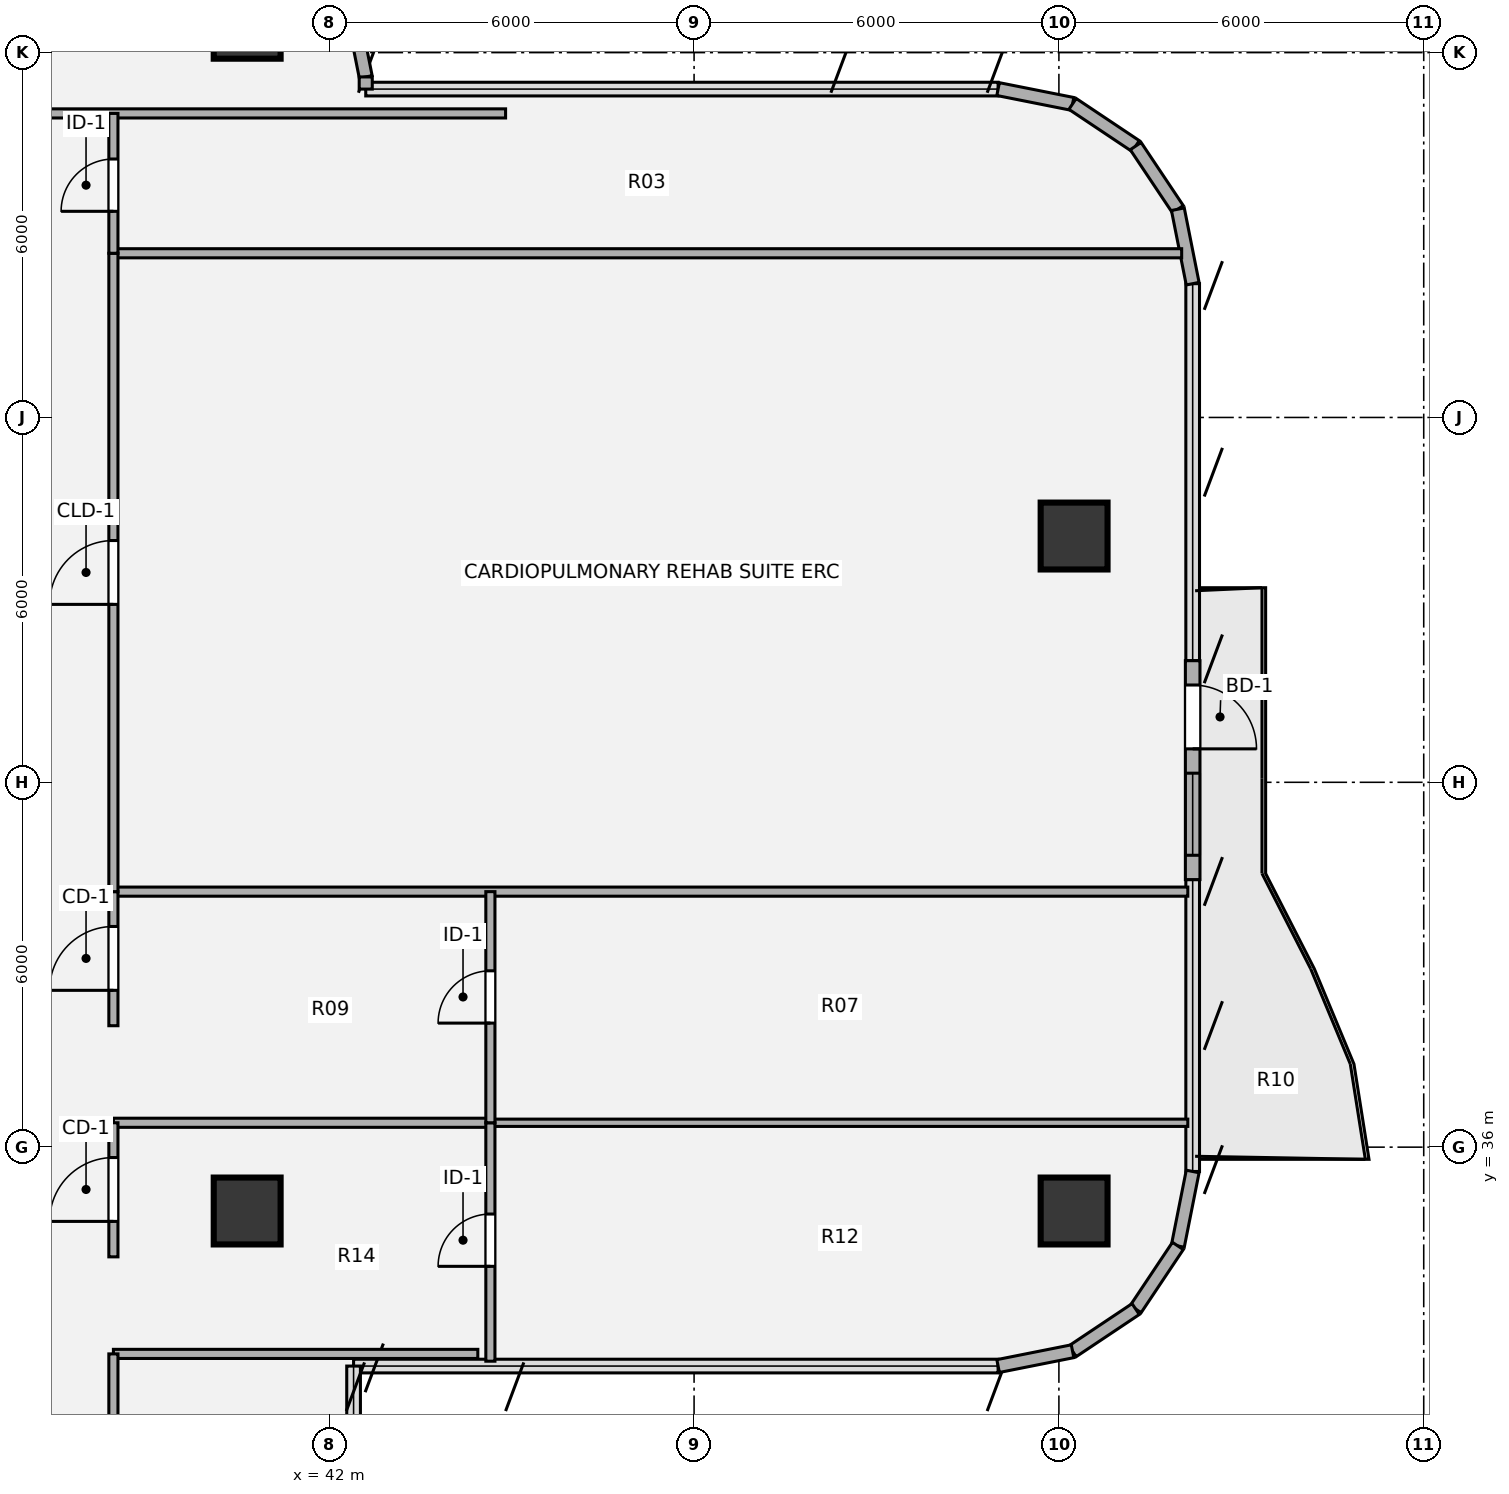
"""IFC4 building model, lengths in metres.
Left out: names, types, materials, properties, quantities, classifications, styles, units other than length and angle.
Written with IfcOpenShell. Run it as: python <this file> out.ifc"""

import sys

from ifc_helpers import new_model, si_unit, direction, frame, frame_2d, origin, origin_2d, place, context, subcontext, project, spatial, rectangle, hollow_circle, extrude, source, transform, mapped, element, fill, save


model = new_model("IFC4")
c1 = context("Model", 3, precision=1e-05, world=origin(), true_north=direction((0.0, 1.0)))
c2 = subcontext(c1, "Body", "Model", "MODEL_VIEW")
j1 = project(units=[si_unit("LENGTHUNIT", "METRE"), si_unit("PLANEANGLEUNIT", "RADIAN")], contexts=[c1])
p1 = place(None, origin())
s1 = spatial("IfcSite", under=j1, at=p1, CompositionType="ELEMENT")
p2 = place(p1, origin())
s2 = spatial("IfcBuilding", under=s1, at=p2, CompositionType="ELEMENT")
p3 = place(p2, frame((0.0, 0.0, 175.32)))
s3 = spatial("IfcBuildingStorey", under=s2, at=p3, CompositionType="ELEMENT", Elevation=175.32)
m1 = source(origin(), c2, "Body", "SweptSolid", [
    extrude(hollow_circle(Radius=0.55, WallThickness=0.04, at=origin_2d()), origin(), (0.0, 0.0, 1.0), 3.78),
])
for number, where, z_axis, x_axis in (
    (1, (54.25, 34.95, 0.0), (0.0, 0.0, 1.0), (1.0, 0.0, 0.0)),
    (2, (54.25, 46.05, 0.0), (0.0, 0.0, 1.0), (1.0, 0.0, 0.0)),
    (3, (40.65, 34.95, 0.0), (0.0, 0.0, 1.0), (1.0, 0.0, 0.0)),
    (4, (40.65, 54.45, 0.0), (0.0, 0.0, 1.0), (1.0, 0.0, 0.0)),
):
    element("IfcColumn", number, at=place(p3, frame(where, z_axis=z_axis, x_axis=x_axis)), inside=s3, PredefinedType="COLUMN", context=c2, shape_type="MappedRepresentation", body=[
        mapped(m1, transform((0.0, 0.0, 0.0), x_axis=(1.0, 0.0, 0.0), y_axis=(0.0, 1.0, 0.0), z_axis=(0.0, 0.0, 1.0), scale=1.0)),
    ])
p4 = place(p3, frame((42.387, 54.671, 0.0), z_axis=(0.0, 0.0, 1.0), x_axis=(0.195127417394, -0.980777900945, 0.0)))
e5 = element("IfcWall", 5, at=p4, inside=s3, PredefinedType="SOLIDWALL", context=c2, shape_type="SweptSolid", body=[
    extrude(rectangle(XDim=1.092, YDim=0.215, at=frame_2d((0.546, 0.0))), origin(), (0.0, 0.0, 1.0), 3.53),
])
p5 = place(p3, frame((42.6, 53.6, 0.0), z_axis=(0.0, 0.0, 1.0), x_axis=(0.0, -1.0, 0.0)))
e6 = element("IfcWall", 6, at=p5, inside=s3, PredefinedType="SOLIDWALL", context=c2, shape_type="SweptSolid", body=[
    extrude(rectangle(XDim=0.2, YDim=0.215, at=frame_2d((0.1, 0.0))), origin(), (0.0, 0.0, 1.0), 3.53),
])
for number, where, z_axis, x_axis in (
    (7, (53.0, 53.4, 0.0), (0.0, 0.0, 1.0), (0.981, -0.195, 0.0)),
    (8, (54.225, 53.156, 0.0), (0.0, 0.0, 1.0), (0.831, -0.556, 0.0)),
    (9, (55.263, 52.463, 0.0), (0.0, 0.0, 1.0), (0.556, -0.831, 0.0)),
    (10, (55.956, 51.425, 0.0), (0.0, 0.0, 1.0), (0.195, -0.981, 0.0)),
):
    element("IfcWall", number, at=place(p3, frame(where, z_axis=z_axis, x_axis=x_axis)), inside=s3, PredefinedType="SOLIDWALL", context=c2, shape_type="SweptSolid", body=[
        extrude(rectangle(XDim=1.249, YDim=0.215, at=frame_2d((0.624, 0.0))), origin(), (0.0, 0.0, 1.0), 3.53),
    ])
p6 = place(p3, frame((56.2, 44.0, 0.0), z_axis=(0.0, 0.0, 1.0), x_axis=(0.0, -1.0, 0.0)))
e11 = element("IfcWall", 11, at=p6, inside=s3, PredefinedType="SOLIDWALL", context=c2, shape_type="SweptSolid", body=[
    extrude(rectangle(XDim=3.6, YDim=0.24, at=frame_2d((1.8, 0.0))), origin(), (0.0, 0.0, 1.0), 3.53),
])
p7 = place(p6, frame((0.4, 0.0, 0.0)))
e12 = element("IfcOpeningElement", 12, at=p7, cuts=e11, PredefinedType="OPENING", context=c2, shape_type="SweptSolid", body=[
    extrude(rectangle(XDim=1.05, YDim=2.15, at=origin_2d()), frame((0.525, 0.13, 1.075), z_axis=(0.0, -1.0, 0.0), x_axis=(1.0, 0.0, 0.0)), (0.0, 0.0, 1.0), 0.26),
])
p8 = place(p6, frame((1.85, 0.0, 0.85)))
e13 = element("IfcOpeningElement", 13, at=p8, cuts=e11, PredefinedType="OPENING", context=c2, shape_type="SweptSolid", body=[
    extrude(rectangle(XDim=1.35, YDim=1.35, at=origin_2d()), frame((0.675, 0.13, 0.675), z_axis=(0.0, -1.0, 0.0), x_axis=(1.0, 0.0, 0.0)), (0.0, 0.0, 1.0), 0.26),
])
for number, where, z_axis, x_axis in (
    (14, (56.2, 35.6, 0.0), (0.0, 0.0, 1.0), (-0.195, -0.981, 0.0)),
    (15, (55.956, 34.375, 0.0), (0.0, 0.0, 1.0), (-0.556, -0.831, 0.0)),
    (16, (55.263, 33.337, 0.0), (0.0, 0.0, 1.0), (-0.831, -0.556, 0.0)),
    (17, (54.225, 32.644, 0.0), (0.0, 0.0, 1.0), (-0.981, -0.195, 0.0)),
):
    element("IfcWall", number, at=place(p3, frame(where, z_axis=z_axis, x_axis=x_axis)), inside=s3, PredefinedType="SOLIDWALL", context=c2, shape_type="SweptSolid", body=[
        extrude(rectangle(XDim=1.249, YDim=0.215, at=frame_2d((0.624, 0.0))), origin(), (0.0, 0.0, 1.0), 3.53),
    ])
p9 = place(p3, frame((38.45, 32.6, 0.0), z_axis=(0.0, 0.0, 1.0), x_axis=(1.0, 0.0, 0.0)))
e18 = element("IfcWall", 18, at=p9, inside=s3, PredefinedType="PARTITIONING", context=c2, shape_type="SweptSolid", body=[
    extrude(rectangle(XDim=5.993, YDim=0.15, at=frame_2d((2.997, 0.0))), origin(), (0.0, 0.0, 1.0), 3.5),
])
p10 = place(p3, frame((38.45, 36.401, 0.0), z_axis=(0.0, 0.0, 1.0), x_axis=(1.0, 0.0, 0.0)))
e19 = element("IfcWall", 19, at=p10, inside=s3, PredefinedType="PARTITIONING", context=c2, shape_type="SweptSolid", body=[
    extrude(rectangle(XDim=6.2, YDim=0.15, at=frame_2d((3.1, 0.0))), origin(), (0.0, 0.0, 1.0), 2.982),
])
p11 = place(p3, frame((44.65, 36.401, 0.0), z_axis=(0.0, 0.0, 1.0), x_axis=(1.0, 0.0, 0.0)))
e20 = element("IfcWall", 20, at=p11, inside=s3, PredefinedType="PARTITIONING", context=c2, shape_type="SweptSolid", body=[
    extrude(rectangle(XDim=11.47, YDim=0.12, at=frame_2d((5.735, 0.0))), origin(), (0.0, 0.0, 1.0), 2.982),
])
p12 = place(p3, frame((38.45, 40.202, 0.0), z_axis=(0.0, 0.0, 1.0), x_axis=(1.0, 0.0, 0.0)))
e21 = element("IfcWall", 21, at=p12, inside=s3, PredefinedType="PARTITIONING", context=c2, shape_type="SweptSolid", body=[
    extrude(rectangle(XDim=17.67, YDim=0.15, at=frame_2d((8.835, 0.0))), origin(), (0.0, 0.0, 1.0), 2.982),
])
p13 = place(p3, frame((38.45, 50.7, 0.0), z_axis=(0.0, 0.0, 1.0), x_axis=(1.0, 0.0, 0.0)))
e22 = element("IfcWall", 22, at=p13, inside=s3, PredefinedType="PARTITIONING", context=c2, shape_type="SweptSolid", body=[
    extrude(rectangle(XDim=17.569, YDim=0.15, at=frame_2d((8.785, 0.0))), origin(), (0.0, 0.0, 1.0), 3.308),
])
p14 = place(p3, frame((27.1, 53.0, 0.0), z_axis=(0.0, 0.0, 1.0), x_axis=(1.0, 0.0, 0.0)))
e23 = element("IfcWall", 23, at=p14, inside=s3, PredefinedType="PARTITIONING", context=c2, shape_type="SweptSolid", body=[
    extrude(rectangle(XDim=17.8, YDim=0.15, at=frame_2d((8.9, 0.0))), origin(), (0.0, 0.0, 1.0), 3.308),
])
p15 = place(p14, frame((8.375, 0.0, 0.0)))
e24 = element("IfcOpeningElement", 24, at=p15, cuts=e23, PredefinedType="OPENING", context=c2, shape_type="SweptSolid", body=[
    extrude(rectangle(XDim=1.05, YDim=2.1, at=origin_2d()), frame((0.525, 0.085, 1.05), z_axis=(0.0, -1.0, 0.0), x_axis=(1.0, 0.0, 0.0)), (0.0, 0.0, 1.0), 0.17),
])
p16 = place(p3, frame((38.45, 22.4, 0.0), z_axis=(0.0, 0.0, 1.0), x_axis=(0.0, 1.0, 0.0)))
e25 = element("IfcWall", 25, at=p16, inside=s3, PredefinedType="PARTITIONING", context=c2, shape_type="SweptSolid", body=[
    extrude(rectangle(XDim=10.2, YDim=0.15, at=frame_2d((5.1, 0.0))), origin(), (0.0, 0.0, 1.0), 3.5),
])
p17 = place(p16, frame((4.475, 0.0, 0.0)))
e26 = element("IfcOpeningElement", 26, at=p17, cuts=e25, PredefinedType="OPENING", context=c2, shape_type="SweptSolid", body=[
    extrude(rectangle(XDim=1.05, YDim=2.1, at=origin_2d()), frame((0.525, 0.085, 1.05), z_axis=(0.0, -1.0, 0.0), x_axis=(1.0, 0.0, 0.0)), (0.0, 0.0, 1.0), 0.17),
])
p18 = place(p3, frame((38.45, 34.196, 0.0), z_axis=(0.0, 0.0, 1.0), x_axis=(0.0, 1.0, 0.0)))
e27 = element("IfcWall", 27, at=p18, inside=s3, PredefinedType="PARTITIONING", context=c2, shape_type="SweptSolid", body=[
    extrude(rectangle(XDim=2.205, YDim=0.15, at=frame_2d((1.103, 0.0))), origin(), (0.0, 0.0, 1.0), 3.5),
])
p19 = place(p18, frame((0.583, 0.0, 0.0)))
e28 = element("IfcOpeningElement", 28, at=p19, cuts=e27, PredefinedType="OPENING", context=c2, shape_type="SweptSolid", body=[
    extrude(rectangle(XDim=1.05, YDim=2.1, at=origin_2d()), frame((0.525, 0.085, 1.05), z_axis=(0.0, -1.0, 0.0), x_axis=(1.0, 0.0, 0.0)), (0.0, 0.0, 1.0), 0.17),
])
p20 = place(p3, frame((38.45, 37.997, 0.0), z_axis=(0.0, 0.0, 1.0), x_axis=(0.0, 1.0, 0.0)))
e29 = element("IfcWall", 29, at=p20, inside=s3, PredefinedType="PARTITIONING", context=c2, shape_type="SweptSolid", body=[
    extrude(rectangle(XDim=2.205, YDim=0.15, at=frame_2d((1.103, 0.0))), origin(), (0.0, 0.0, 1.0), 3.5),
])
p21 = place(p20, frame((0.582, 0.0, 0.0)))
e30 = element("IfcOpeningElement", 30, at=p21, cuts=e29, PredefinedType="OPENING", context=c2, shape_type="SweptSolid", body=[
    extrude(rectangle(XDim=1.05, YDim=2.1, at=origin_2d()), frame((0.525, 0.085, 1.05), z_axis=(0.0, -1.0, 0.0), x_axis=(1.0, 0.0, 0.0)), (0.0, 0.0, 1.0), 0.17),
])
p22 = place(p3, frame((38.45, 40.202, 0.0), z_axis=(0.0, 0.0, 1.0), x_axis=(0.0, 1.0, 0.0)))
e31 = element("IfcWall", 31, at=p22, inside=s3, PredefinedType="PARTITIONING", context=c2, shape_type="SweptSolid", body=[
    extrude(rectangle(XDim=10.498, YDim=0.15, at=frame_2d((5.249, 0.0))), origin(), (0.0, 0.0, 1.0), 3.5),
])
p23 = place(p22, frame((4.724, 0.0, 0.0)))
e32 = element("IfcOpeningElement", 32, at=p23, cuts=e31, PredefinedType="OPENING", context=c2, shape_type="SweptSolid", body=[
    extrude(rectangle(XDim=1.05, YDim=2.1, at=origin_2d()), frame((0.525, 0.085, 1.05), z_axis=(0.0, -1.0, 0.0), x_axis=(1.0, 0.0, 0.0)), (0.0, 0.0, 1.0), 0.17),
])
p24 = place(p3, frame((38.45, 50.7, 0.0), z_axis=(0.0, 0.0, 1.0), x_axis=(0.0, 1.0, 0.0)))
e33 = element("IfcWall", 33, at=p24, inside=s3, PredefinedType="PARTITIONING", context=c2, shape_type="SweptSolid", body=[
    extrude(rectangle(XDim=2.3, YDim=0.15, at=frame_2d((1.15, 0.0))), origin(), (0.0, 0.0, 1.0), 3.5),
])
p25 = place(p24, frame((0.69, 0.0, 0.0)))
e34 = element("IfcOpeningElement", 34, at=p25, cuts=e33, PredefinedType="OPENING", context=c2, shape_type="SweptSolid", body=[
    extrude(rectangle(XDim=0.86, YDim=2.1, at=origin_2d()), frame((0.43, 0.085, 1.05), z_axis=(0.0, -1.0, 0.0), x_axis=(1.0, 0.0, 0.0)), (0.0, 0.0, 1.0), 0.17),
])
p26 = place(p3, frame((44.65, 32.48, 0.0), z_axis=(0.0, 0.0, 1.0), x_axis=(0.0, 1.0, 0.0)))
e35 = element("IfcWall", 35, at=p26, inside=s3, PredefinedType="PARTITIONING", context=c2, shape_type="SweptSolid", body=[
    extrude(rectangle(XDim=3.921, YDim=0.15, at=frame_2d((1.96, 0.0))), origin(), (0.0, 0.0, 1.0), 3.5),
])
p27 = place(p26, frame((1.56, 0.0, 0.0)))
e36 = element("IfcOpeningElement", 36, at=p27, cuts=e35, PredefinedType="OPENING", context=c2, shape_type="SweptSolid", body=[
    extrude(rectangle(XDim=0.86, YDim=2.1, at=origin_2d()), frame((0.43, 0.085, 1.05), z_axis=(0.0, -1.0, 0.0), x_axis=(1.0, 0.0, 0.0)), (0.0, 0.0, 1.0), 0.17),
])
p28 = place(p3, frame((44.65, 36.401, 0.0), z_axis=(0.0, 0.0, 1.0), x_axis=(0.0, 1.0, 0.0)))
e37 = element("IfcWall", 37, at=p28, inside=s3, PredefinedType="PARTITIONING", context=c2, shape_type="SweptSolid", body=[
    extrude(rectangle(XDim=3.801, YDim=0.15, at=frame_2d((1.9, 0.0))), origin(), (0.0, 0.0, 1.0), 3.5),
])
p29 = place(p28, frame((1.639, 0.0, 0.0)))
e38 = element("IfcOpeningElement", 38, at=p29, cuts=e37, PredefinedType="OPENING", context=c2, shape_type="SweptSolid", body=[
    extrude(rectangle(XDim=0.86, YDim=2.1, at=origin_2d()), frame((0.43, 0.085, 1.05), z_axis=(0.0, -1.0, 0.0), x_axis=(1.0, 0.0, 0.0)), (0.0, 0.0, 1.0), 0.17),
])
m2 = source(origin(), c2, "Body", "SweptSolid", [
    extrude(rectangle(XDim=1.05, YDim=2.15, at=origin_2d()), frame((0.525, 0.025, 1.075), z_axis=(0.0, -1.0, 0.0), x_axis=(1.0, 0.0, 0.0)), (0.0, 0.0, 1.0), 0.05),
])
p30 = place(p7, origin())
e39 = element("IfcDoor", 39, at=p30, inside=s3, OperationType="SINGLE_SWING_RIGHT", PredefinedType="DOOR", context=c2, shape_type="MappedRepresentation", body=[
    mapped(m2, transform((0.0, 0.0, 0.0), x_axis=(1.0, 0.0, 0.0), y_axis=(0.0, 1.0, 0.0), z_axis=(0.0, 0.0, 1.0), scale=1.0)),
])
fill(e12, e39)
m3 = source(origin(), c2, "Body", "SweptSolid", [
    extrude(rectangle(XDim=1.35, YDim=1.35, at=origin_2d()), frame((0.675, 0.03, 0.675), z_axis=(0.0, -1.0, 0.0), x_axis=(1.0, 0.0, 0.0)), (0.0, 0.0, 1.0), 0.06),
])
p31 = place(p8, origin())
e40 = element("IfcWindow", 40, at=p31, inside=s3, PartitioningType="SINGLE_PANEL", PredefinedType="WINDOW", context=c2, shape_type="MappedRepresentation", body=[
    mapped(m3, transform((0.0, 0.0, 0.0), x_axis=(1.0, 0.0, 0.0), y_axis=(0.0, 1.0, 0.0), z_axis=(0.0, 0.0, 1.0), scale=1.0)),
])
fill(e13, e40)
m4 = source(origin(), c2, "Body", "SweptSolid", [
    extrude(rectangle(XDim=1.05, YDim=2.1, at=origin_2d()), frame((0.525, 0.025, 1.05), z_axis=(0.0, -1.0, 0.0), x_axis=(1.0, 0.0, 0.0)), (0.0, 0.0, 1.0), 0.05),
])
p32 = place(p19, origin())
e41 = element("IfcDoor", 41, at=p32, inside=s3, OperationType="SINGLE_SWING_LEFT", PredefinedType="DOOR", context=c2, shape_type="MappedRepresentation", body=[
    mapped(m4, transform((0.0, 0.0, 0.0), x_axis=(1.0, 0.0, 0.0), y_axis=(0.0, 1.0, 0.0), z_axis=(0.0, 0.0, 1.0), scale=1.0)),
])
fill(e28, e41)
p33 = place(p21, origin())
e42 = element("IfcDoor", 42, at=p33, inside=s3, OperationType="SINGLE_SWING_LEFT", PredefinedType="DOOR", context=c2, shape_type="MappedRepresentation", body=[
    mapped(m4, transform((0.0, 0.0, 0.0), x_axis=(1.0, 0.0, 0.0), y_axis=(0.0, 1.0, 0.0), z_axis=(0.0, 0.0, 1.0), scale=1.0)),
])
fill(e30, e42)
m5 = source(origin(), c2, "Body", "SweptSolid", [
    extrude(rectangle(XDim=1.05, YDim=2.1, at=origin_2d()), frame((0.525, 0.025, 1.05), z_axis=(0.0, -1.0, 0.0), x_axis=(1.0, 0.0, 0.0)), (0.0, 0.0, 1.0), 0.05),
])
p34 = place(p23, origin())
e43 = element("IfcDoor", 43, at=p34, inside=s3, OperationType="SINGLE_SWING_LEFT", PredefinedType="DOOR", context=c2, shape_type="MappedRepresentation", body=[
    mapped(m5, transform((0.0, 0.0, 0.0), x_axis=(1.0, 0.0, 0.0), y_axis=(0.0, 1.0, 0.0), z_axis=(0.0, 0.0, 1.0), scale=1.0)),
])
fill(e32, e43)
m6 = source(origin(), c2, "Body", "SweptSolid", [
    extrude(rectangle(XDim=0.86, YDim=2.1, at=origin_2d()), frame((0.43, 0.025, 1.05), z_axis=(0.0, -1.0, 0.0), x_axis=(1.0, 0.0, 0.0)), (0.0, 0.0, 1.0), 0.05),
])
p35 = place(p25, origin())
e44 = element("IfcDoor", 44, at=p35, inside=s3, OperationType="SINGLE_SWING_LEFT", PredefinedType="DOOR", context=c2, shape_type="MappedRepresentation", body=[
    mapped(m6, transform((0.0, 0.0, 0.0), x_axis=(1.0, 0.0, 0.0), y_axis=(0.0, 1.0, 0.0), z_axis=(0.0, 0.0, 1.0), scale=1.0)),
])
fill(e34, e44)
p36 = place(p27, origin())
e45 = element("IfcDoor", 45, at=p36, inside=s3, OperationType="SINGLE_SWING_LEFT", PredefinedType="DOOR", context=c2, shape_type="MappedRepresentation", body=[
    mapped(m6, transform((0.0, 0.0, 0.0), x_axis=(1.0, 0.0, 0.0), y_axis=(0.0, 1.0, 0.0), z_axis=(0.0, 0.0, 1.0), scale=1.0)),
])
fill(e36, e45)
p37 = place(p29, origin())
e46 = element("IfcDoor", 46, at=p37, inside=s3, OperationType="SINGLE_SWING_LEFT", PredefinedType="DOOR", context=c2, shape_type="MappedRepresentation", body=[
    mapped(m6, transform((0.0, 0.0, 0.0), x_axis=(1.0, 0.0, 0.0), y_axis=(0.0, 1.0, 0.0), z_axis=(0.0, 0.0, 1.0), scale=1.0)),
])
fill(e38, e46)
save(model, sys.argv[1])
